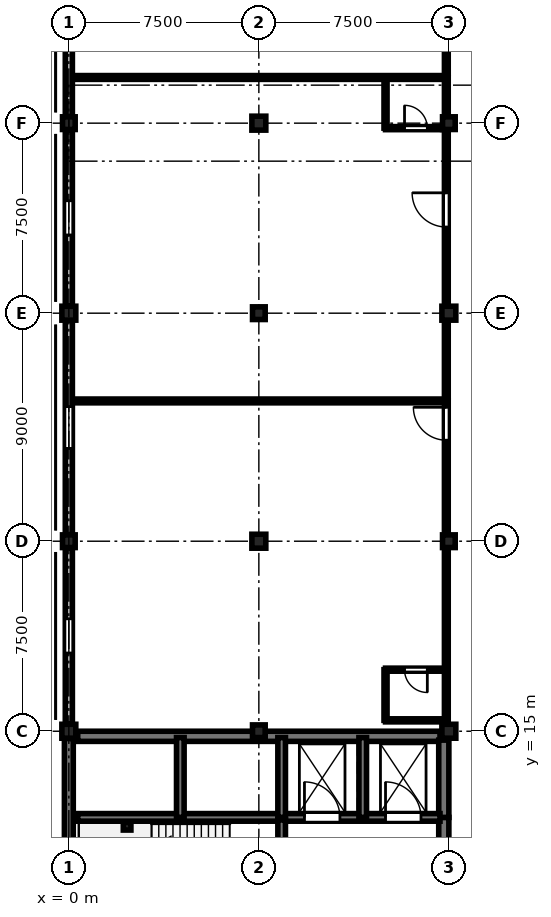
"""IFC4 building model, lengths in metres.
Left out: names, types, materials, properties, quantities, classifications, styles, units other than length and angle.
Written with IfcOpenShell. Run it as: python <this file> out.ifc"""

import sys

from ifc_helpers import new_model, si_unit, direction, frame, frame_2d, origin, origin_2d, place, context, subcontext, project, spatial, rectangle, i_section, extrude, element, fill, save


model = new_model("IFC4")
c1 = context("Model", 3, precision=1e-05, world=origin(), true_north=direction((0.0, 1.0)))
c2 = subcontext(c1, "Body", "Model", "MODEL_VIEW")
j1 = project(units=[si_unit("LENGTHUNIT", "METRE"), si_unit("PLANEANGLEUNIT", "RADIAN")], contexts=[c1])
p1 = place(None, origin())
s1 = spatial("IfcSite", under=j1, at=p1, CompositionType="ELEMENT")
p2 = place(p1, origin())
s2 = spatial("IfcBuilding", under=s1, at=p2, CompositionType="ELEMENT")
p3 = place(p2, frame((0.0, 0.0, 25.95)))
s3 = spatial("IfcBuildingStorey", under=s2, at=p3, CompositionType="ELEMENT", Elevation=25.95)
p4 = place(p3, frame((0.0, 15.0, 0.0), z_axis=(0.0, 0.0, 1.0), x_axis=(1.0, 0.0, 0.0)))
e1 = element("IfcColumn", 1, at=p4, inside=s3, PredefinedType="COLUMN", context=c2, shape_type="SweptSolid", body=[
    extrude(rectangle(XDim=0.55, YDim=0.55, at=origin_2d()), origin(), (0.0, 0.0, 1.0), 4.05),
])
p5 = place(p3, frame((0.0, 22.5, 0.0), z_axis=(0.0, 0.0, 1.0), x_axis=(1.0, 0.0, 0.0)))
e2 = element("IfcColumn", 2, at=p5, inside=s3, PredefinedType="COLUMN", context=c2, shape_type="SweptSolid", body=[
    extrude(rectangle(XDim=0.5, YDim=0.5, at=origin_2d()), origin(), (0.0, 0.0, 1.0), 4.05),
])
p6 = place(p3, frame((0.0, 31.5, 0.0), z_axis=(0.0, 0.0, 1.0), x_axis=(1.0, 0.0, 0.0)))
e3 = element("IfcColumn", 3, at=p6, inside=s3, PredefinedType="COLUMN", context=c2, shape_type="SweptSolid", body=[
    extrude(rectangle(XDim=0.55, YDim=0.55, at=origin_2d()), origin(), (0.0, 0.0, 1.0), 4.05),
])
for number, where, z_axis, x_axis in (
    (4, (0.0, 39.0, 0.0), (0.0, 0.0, 1.0), (1.0, 0.0, 0.0)),
    (5, (7.5, 15.0, 0.0), (0.0, 0.0, 1.0), (1.0, 0.0, 0.0)),
):
    element("IfcColumn", number, at=place(p3, frame(where, z_axis=z_axis, x_axis=x_axis)), inside=s3, PredefinedType="COLUMN", context=c2, shape_type="SweptSolid", body=[
        extrude(rectangle(XDim=0.5, YDim=0.5, at=origin_2d()), origin(), (0.0, 0.0, 1.0), 4.05),
    ])
p7 = place(p3, frame((7.5, 22.5, 0.0), z_axis=(0.0, 0.0, 1.0), x_axis=(1.0, 0.0, 0.0)))
e6 = element("IfcColumn", 6, at=p7, inside=s3, PredefinedType="COLUMN", context=c2, shape_type="SweptSolid", body=[
    extrude(rectangle(XDim=0.55, YDim=0.55, at=origin_2d()), origin(), (0.0, 0.0, 1.0), 4.05),
])
p8 = place(p3, frame((7.5, 31.5, 0.0), z_axis=(0.0, 0.0, 1.0), x_axis=(1.0, 0.0, 0.0)))
e7 = element("IfcColumn", 7, at=p8, inside=s3, PredefinedType="COLUMN", context=c2, shape_type="SweptSolid", body=[
    extrude(rectangle(XDim=0.5, YDim=0.5, at=origin_2d()), origin(), (0.0, 0.0, 1.0), 4.05),
])
for number, where, z_axis, x_axis in (
    (8, (7.5, 39.0, 0.0), (0.0, 0.0, 1.0), (1.0, 0.0, 0.0)),
    (9, (15.0, 15.0, 0.0), (0.0, 0.0, 1.0), (1.0, 0.0, 0.0)),
):
    element("IfcColumn", number, at=place(p3, frame(where, z_axis=z_axis, x_axis=x_axis)), inside=s3, PredefinedType="COLUMN", context=c2, shape_type="SweptSolid", body=[
        extrude(rectangle(XDim=0.55, YDim=0.55, at=origin_2d()), origin(), (0.0, 0.0, 1.0), 4.05),
    ])
p9 = place(p3, frame((15.0, 22.5, 0.0), z_axis=(0.0, 0.0, 1.0), x_axis=(1.0, 0.0, 0.0)))
e10 = element("IfcColumn", 10, at=p9, inside=s3, PredefinedType="COLUMN", context=c2, shape_type="SweptSolid", body=[
    extrude(rectangle(XDim=0.5, YDim=0.5, at=origin_2d()), origin(), (0.0, 0.0, 1.0), 4.05),
])
p10 = place(p3, frame((15.0, 31.5, 0.0), z_axis=(0.0, 0.0, 1.0), x_axis=(1.0, 0.0, 0.0)))
e11 = element("IfcColumn", 11, at=p10, inside=s3, PredefinedType="COLUMN", context=c2, shape_type="SweptSolid", body=[
    extrude(rectangle(XDim=0.55, YDim=0.55, at=origin_2d()), origin(), (0.0, 0.0, 1.0), 4.05),
])
p11 = place(p3, frame((15.0, 39.0, 0.0), z_axis=(0.0, 0.0, 1.0), x_axis=(1.0, 0.0, 0.0)))
e12 = element("IfcColumn", 12, at=p11, inside=s3, PredefinedType="COLUMN", context=c2, shape_type="SweptSolid", body=[
    extrude(rectangle(XDim=0.5, YDim=0.5, at=origin_2d()), origin(), (0.0, 0.0, 1.0), 4.05),
])
p12 = place(p3, frame((2.3, 11.25, 0.0), z_axis=(0.0, 0.0, 1.0), x_axis=(1.0, 0.0, 0.0)))
e13 = element("IfcColumn", 13, at=p12, inside=s3, PredefinedType="COLUMN", context=c2, shape_type="SweptSolid", body=[
    extrude(i_section(OverallWidth=0.3, OverallDepth=0.3, WebThickness=0.011, FlangeThickness=0.019, FilletRadius=0.027, at=origin_2d()), origin(), (0.0, 0.0, 1.0), 4.05),
])
p13 = place(p3, frame((0.0, 7.76, 0.0), z_axis=(0.0, 0.0, 1.0), x_axis=(0.0, 1.0, 0.0)))
e14 = element("IfcWall", 14, at=p13, inside=s3, PredefinedType="SHEAR", context=c2, shape_type="SweptSolid", body=[
    extrude(rectangle(XDim=6.955, YDim=0.35, at=frame_2d((3.478, 0.0))), origin(), (0.0, 0.0, 1.0), 3.77),
])
p14 = place(p3, frame((0.0, 15.285, 0.0), z_axis=(0.0, 0.0, 1.0), x_axis=(0.0, 1.0, 0.0)))
e15 = element("IfcWall", 15, at=p14, inside=s3, PredefinedType="STANDARD", context=c2, shape_type="SweptSolid", body=[
    extrude(rectangle(XDim=6.955, YDim=0.28, at=frame_2d((3.478, 0.0))), origin(), (0.0, 0.0, 1.0), 3.17),
])
p15 = place(p14, frame((2.802, 0.0, 0.85)))
e16 = element("IfcOpeningElement", 16, at=p15, cuts=e15, PredefinedType="OPENING", context=c2, shape_type="SweptSolid", body=[
    extrude(rectangle(XDim=1.35, YDim=2.04, at=frame_2d((0.675, 1.02))), frame((0.0, 0.15, 0.0), z_axis=(0.0, -1.0, 0.0), x_axis=(1.0, 0.0, 0.0)), (0.0, 0.0, 1.0), 0.3),
])
p16 = place(p3, frame((0.0, 22.76, 0.0), z_axis=(0.0, 0.0, 1.0), x_axis=(0.0, 1.0, 0.0)))
e17 = element("IfcWall", 17, at=p16, inside=s3, PredefinedType="STANDARD", context=c2, shape_type="SweptSolid", body=[
    extrude(rectangle(XDim=8.455, YDim=0.28, at=frame_2d((4.228, 0.0))), origin(), (0.0, 0.0, 1.0), 3.22),
])
p17 = place(p16, frame((3.403, 0.0, 0.85)))
e18 = element("IfcOpeningElement", 18, at=p17, cuts=e17, PredefinedType="OPENING", context=c2, shape_type="SweptSolid", body=[
    extrude(rectangle(XDim=1.65, YDim=2.09, at=frame_2d((0.825, 1.045))), frame((0.0, 0.15, 0.0), z_axis=(0.0, -1.0, 0.0), x_axis=(1.0, 0.0, 0.0)), (0.0, 0.0, 1.0), 0.3),
])
p18 = place(p3, frame((0.0, 31.785, 0.0), z_axis=(0.0, 0.0, 1.0), x_axis=(0.0, 1.0, 0.0)))
e19 = element("IfcWall", 19, at=p18, inside=s3, PredefinedType="STANDARD", context=c2, shape_type="SweptSolid", body=[
    extrude(rectangle(XDim=6.955, YDim=0.28, at=frame_2d((3.478, 0.0))), origin(), (0.0, 0.0, 1.0), 3.17),
])
p19 = place(p18, frame((2.802, 0.0, 0.85)))
e20 = element("IfcOpeningElement", 20, at=p19, cuts=e19, PredefinedType="OPENING", context=c2, shape_type="SweptSolid", body=[
    extrude(rectangle(XDim=1.35, YDim=2.04, at=frame_2d((0.675, 1.02))), frame((0.0, 0.15, 0.0), z_axis=(0.0, -1.0, 0.0), x_axis=(1.0, 0.0, 0.0)), (0.0, 0.0, 1.0), 0.3),
])
p20 = place(p3, frame((0.0, 39.26, 0.0), z_axis=(0.0, 0.0, 1.0), x_axis=(0.0, 1.0, 0.0)))
e21 = element("IfcWall", 21, at=p20, inside=s3, PredefinedType="STANDARD", context=c2, shape_type="SweptSolid", body=[
    extrude(rectangle(XDim=6.955, YDim=0.28, at=frame_2d((3.478, 0.0))), origin(), (0.0, 0.0, 1.0), 3.17),
])
p21 = place(p20, frame((2.653, 0.0, 0.85)))
e22 = element("IfcOpeningElement", 22, at=p21, cuts=e21, PredefinedType="OPENING", context=c2, shape_type="SweptSolid", body=[
    extrude(rectangle(XDim=1.65, YDim=2.04, at=frame_2d((0.825, 1.02))), frame((0.0, 0.15, 0.0), z_axis=(0.0, -1.0, 0.0), x_axis=(1.0, 0.0, 0.0)), (0.0, 0.0, 1.0), 0.3),
])
p22 = place(p3, frame((0.35, 14.8, 0.0), z_axis=(0.0, 0.0, 1.0), x_axis=(1.0, 0.0, 0.0)))
e23 = element("IfcWall", 23, at=p22, inside=s3, PredefinedType="SHEAR", context=c2, shape_type="SweptSolid", body=[
    extrude(rectangle(XDim=14.3, YDim=0.4, at=frame_2d((7.15, 0.0))), origin(), (0.0, 0.0, 1.0), 3.77),
])
p23 = place(p3, frame((14.8, 7.85, 0.0), z_axis=(0.0, 0.0, 1.0), x_axis=(0.0, 1.0, 0.0)))
e24 = element("IfcWall", 24, at=p23, inside=s3, PredefinedType="SHEAR", context=c2, shape_type="SweptSolid", body=[
    extrude(rectangle(XDim=3.75, YDim=0.4, at=frame_2d((1.875, 0.0))), origin(), (0.0, 0.0, 1.0), 3.77),
])
p24 = place(p3, frame((14.8, 11.6, 0.0), z_axis=(0.0, 0.0, 1.0), x_axis=(0.0, 1.0, 0.0)))
e25 = element("IfcWall", 25, at=p24, inside=s3, PredefinedType="SHEAR", context=c2, shape_type="SweptSolid", body=[
    extrude(rectangle(XDim=3.05, YDim=0.4, at=frame_2d((1.525, 0.0))), origin(), (0.0, 0.0, 1.0), 3.77),
])
p25 = place(p3, frame((0.35, 11.6, 0.0), z_axis=(0.0, 0.0, 1.0), x_axis=(1.0, 0.0, 0.0)))
e26 = element("IfcWall", 26, at=p25, inside=s3, PredefinedType="SHEAR", context=c2, shape_type="SweptSolid", body=[
    extrude(rectangle(XDim=8.05, YDim=0.3, at=frame_2d((4.025, 0.0))), origin(), (0.0, 0.0, 1.0), 3.77),
])
p26 = place(p3, frame((8.4, 11.6, 0.0), z_axis=(0.0, 0.0, 1.0), x_axis=(1.0, 0.0, 0.0)))
e27 = element("IfcWall", 27, at=p26, inside=s3, PredefinedType="SHEAR", context=c2, shape_type="SweptSolid", body=[
    extrude(rectangle(XDim=6.25, YDim=0.3, at=frame_2d((3.125, 0.0))), origin(), (0.0, 0.0, 1.0), 3.77),
])
p27 = place(p26, frame((0.9, 0.0, 0.0)))
e28 = element("IfcOpeningElement", 28, at=p27, cuts=e27, PredefinedType="OPENING", context=c2, shape_type="SweptSolid", body=[
    extrude(rectangle(XDim=1.4, YDim=2.25, at=frame_2d((0.7, 1.125))), frame((0.0, 0.16, 0.0), z_axis=(0.0, -1.0, 0.0), x_axis=(1.0, 0.0, 0.0)), (0.0, 0.0, 1.0), 0.32),
])
p28 = place(p26, frame((4.1, 0.0, 0.0)))
e29 = element("IfcOpeningElement", 29, at=p28, cuts=e27, PredefinedType="OPENING", context=c2, shape_type="SweptSolid", body=[
    extrude(rectangle(XDim=1.4, YDim=2.25, at=frame_2d((0.7, 1.125))), frame((0.0, 0.16, 0.0), z_axis=(0.0, -1.0, 0.0), x_axis=(1.0, 0.0, 0.0)), (0.0, 0.0, 1.0), 0.32),
])
p29 = place(p3, frame((8.4, 11.5, 0.0), z_axis=(0.0, 0.0, 1.0), x_axis=(0.0, -1.0, 0.0)))
e30 = element("IfcWall", 30, at=p29, inside=s3, PredefinedType="SHEAR", context=c2, shape_type="SweptSolid", body=[
    extrude(rectangle(XDim=3.65, YDim=0.3, at=frame_2d((1.825, 0.0))), origin(), (0.0, 0.0, 1.0), 3.77),
])
p30 = place(p29, frame((1.22, 0.0, 0.0)))
e31 = element("IfcOpeningElement", 31, at=p30, cuts=e30, PredefinedType="OPENING", context=c2, shape_type="SweptSolid", body=[
    extrude(rectangle(XDim=1.2, YDim=2.25, at=frame_2d((0.6, 1.125))), frame((0.0, 0.16, 0.0), z_axis=(0.0, -1.0, 0.0), x_axis=(1.0, 0.0, 0.0)), (0.0, 0.0, 1.0), 0.32),
])
for number, where, z_axis, x_axis in (
    (32, (4.4, 11.6, 0.0), (0.0, 0.0, 1.0), (0.0, 1.0, 0.0)),
    (33, (8.4, 11.6, 0.0), (0.0, 0.0, 1.0), (0.0, 1.0, 0.0)),
    (34, (11.6, 11.6, 0.0), (0.0, 0.0, 1.0), (0.0, 1.0, 0.0)),
):
    element("IfcWall", number, at=place(p3, frame(where, z_axis=z_axis, x_axis=x_axis)), inside=s3, PredefinedType="SHEAR", context=c2, shape_type="SweptSolid", body=[
        extrude(rectangle(XDim=3.15, YDim=0.3, at=frame_2d((1.575, 0.0))), origin(), (0.0, 0.0, 1.0), 3.77),
    ])
p31 = place(p3, frame((14.9, 15.43, 0.0), z_axis=(0.0, 0.0, 1.0), x_axis=(0.0, 1.0, 0.0)))
e35 = element("IfcWall", 35, at=p31, inside=s3, PredefinedType="PARTITIONING", context=c2, shape_type="SweptSolid", body=[
    extrude(rectangle(XDim=12.607, YDim=0.15, at=frame_2d((6.303, 0.0))), origin(), (0.0, 0.0, 1.0), 3.055),
])
p32 = place(p31, frame((11.057, 0.0, 0.0)))
e36 = element("IfcOpeningElement", 36, at=p32, cuts=e35, PredefinedType="OPENING", context=c2, shape_type="SweptSolid", body=[
    extrude(rectangle(XDim=1.3, YDim=2.2, at=frame_2d((0.65, 1.1))), frame((0.0, 0.085, 0.0), z_axis=(0.0, -1.0, 0.0), x_axis=(1.0, 0.0, 0.0)), (0.0, 0.0, 1.0), 0.17),
])
p33 = place(p3, frame((14.9, 17.43, 0.0), z_axis=(0.0, 0.0, 1.0), x_axis=(-1.0, 0.0, 0.0)))
e37 = element("IfcWall", 37, at=p33, inside=s3, PredefinedType="PARTITIONING", context=c2, shape_type="SweptSolid", body=[
    extrude(rectangle(XDim=2.4, YDim=0.12, at=frame_2d((1.2, 0.0))), origin(), (0.0, 0.0, 1.0), 3.755),
])
p34 = place(p33, frame((0.75, 0.0, 0.0)))
e38 = element("IfcOpeningElement", 38, at=p34, cuts=e37, PredefinedType="OPENING", context=c2, shape_type="SweptSolid", body=[
    extrude(rectangle(XDim=0.9, YDim=2.1, at=frame_2d((0.45, 1.05))), frame((0.0, 0.07, 0.0), z_axis=(0.0, -1.0, 0.0), x_axis=(1.0, 0.0, 0.0)), (0.0, 0.0, 1.0), 0.14),
])
p35 = place(p3, frame((12.5, 15.43, 0.0), z_axis=(0.0, 0.0, 1.0), x_axis=(0.0, 1.0, 0.0)))
e39 = element("IfcWall", 39, at=p35, inside=s3, PredefinedType="PARTITIONING", context=c2, shape_type="SweptSolid", body=[
    extrude(rectangle(XDim=2.0, YDim=0.12, at=frame_2d((1.0, 0.0))), origin(), (0.0, 0.0, 1.0), 3.755),
])
p36 = place(p3, frame((14.9, 28.197, 0.0), z_axis=(0.0, 0.0, 1.0), x_axis=(0.0, 1.0, 0.0)))
e40 = element("IfcWall", 40, at=p36, inside=s3, PredefinedType="PARTITIONING", context=c2, shape_type="SweptSolid", body=[
    extrude(rectangle(XDim=12.606, YDim=0.15, at=frame_2d((6.303, 0.0))), origin(), (0.0, 0.0, 1.0), 3.055),
])
p37 = place(p36, frame((6.704, 0.0, 0.0)))
e41 = element("IfcOpeningElement", 41, at=p37, cuts=e40, PredefinedType="OPENING", context=c2, shape_type="SweptSolid", body=[
    extrude(rectangle(XDim=1.35, YDim=2.25, at=frame_2d((0.675, 1.125))), frame((0.0, 0.085, 0.0), z_axis=(0.0, -1.0, 0.0), x_axis=(1.0, 0.0, 0.0)), (0.0, 0.0, 1.0), 0.17),
])
p38 = place(p3, frame((12.5, 38.803, 0.0), z_axis=(0.0, 0.0, 1.0), x_axis=(1.0, 0.0, 0.0)))
e42 = element("IfcWall", 42, at=p38, inside=s3, PredefinedType="PARTITIONING", context=c2, shape_type="SweptSolid", body=[
    extrude(rectangle(XDim=2.4, YDim=0.12, at=frame_2d((1.2, 0.0))), origin(), (0.0, 0.0, 1.0), 3.155),
])
p39 = place(p38, frame((0.75, 0.0, 0.0)))
e43 = element("IfcOpeningElement", 43, at=p39, cuts=e42, PredefinedType="OPENING", context=c2, shape_type="SweptSolid", body=[
    extrude(rectangle(XDim=0.9, YDim=2.1, at=frame_2d((0.45, 1.05))), frame((0.0, 0.07, 0.0), z_axis=(0.0, -1.0, 0.0), x_axis=(1.0, 0.0, 0.0)), (0.0, 0.0, 1.0), 0.14),
])
p40 = place(p3, frame((12.5, 38.803, 0.0), z_axis=(0.0, 0.0, 1.0), x_axis=(0.0, 1.0, 0.0)))
e44 = element("IfcWall", 44, at=p40, inside=s3, PredefinedType="PARTITIONING", context=c2, shape_type="SweptSolid", body=[
    extrude(rectangle(XDim=2.0, YDim=0.12, at=frame_2d((1.0, 0.0))), origin(), (0.0, 0.0, 1.0), 3.755),
])
p41 = place(p3, frame((14.9, 40.963, 0.0), z_axis=(0.0, 0.0, 1.0), x_axis=(0.0, 1.0, 0.0)))
e45 = element("IfcWall", 45, at=p41, inside=s3, PredefinedType="PARTITIONING", context=c2, shape_type="SweptSolid", body=[
    extrude(rectangle(XDim=12.607, YDim=0.15, at=frame_2d((6.303, 0.0))), origin(), (0.0, 0.0, 1.0), 3.205),
])
p42 = place(p41, frame((1.331, 0.0, 0.0)))
e46 = element("IfcOpeningElement", 46, at=p42, cuts=e45, PredefinedType="OPENING", context=c2, shape_type="SweptSolid", body=[
    extrude(rectangle(XDim=1.3, YDim=2.2, at=frame_2d((0.65, 1.1))), frame((0.0, 0.085, 0.0), z_axis=(0.0, -1.0, 0.0), x_axis=(1.0, 0.0, 0.0)), (0.0, 0.0, 1.0), 0.17),
])
for number, where, z_axis, x_axis in (
    (47, (0.35, 28.037, 0.0), (0.0, 0.0, 1.0), (1.0, 0.0, 0.0)),
    (48, (0.35, 40.803, 0.0), (0.0, 0.0, 1.0), (1.0, 0.0, 0.0)),
):
    element("IfcWall", number, at=place(p3, frame(where, z_axis=z_axis, x_axis=x_axis)), inside=s3, PredefinedType="PARTITIONING", context=c2, shape_type="SweptSolid", body=[
        extrude(rectangle(XDim=14.55, YDim=0.15, at=frame_2d((7.275, 0.0))), origin(), (0.0, 0.0, 1.0), 3.755),
    ])
p43 = place(p3, frame((12.5, 15.43, 0.0), z_axis=(0.0, 0.0, 1.0), x_axis=(1.0, 0.0, 0.0)))
e49 = element("IfcWall", 49, at=p43, inside=s3, PredefinedType="PARTITIONING", context=c2, shape_type="SweptSolid", body=[
    extrude(rectangle(XDim=2.4, YDim=0.12, at=frame_2d((1.2, 0.0))), origin(), (0.0, 0.0, 1.0), 3.755),
])
p44 = place(p15, origin())
e50 = element("IfcWindow", 50, at=p44, inside=s3, PartitioningType="SINGLE_PANEL", PredefinedType="WINDOW", context=c2, shape_type="SweptSolid", body=[
    extrude(rectangle(XDim=1.35, YDim=2.04, at=frame_2d((0.675, 1.02))), frame((0.0, 0.03, 0.0), z_axis=(0.0, -1.0, 0.0), x_axis=(1.0, 0.0, 0.0)), (0.0, 0.0, 1.0), 0.06),
])
fill(e16, e50)
p45 = place(p17, origin())
e51 = element("IfcWindow", 51, at=p45, inside=s3, PartitioningType="SINGLE_PANEL", PredefinedType="WINDOW", context=c2, shape_type="SweptSolid", body=[
    extrude(rectangle(XDim=1.65, YDim=2.09, at=frame_2d((0.825, 1.045))), frame((0.0, 0.03, 0.0), z_axis=(0.0, -1.0, 0.0), x_axis=(1.0, 0.0, 0.0)), (0.0, 0.0, 1.0), 0.06),
])
fill(e18, e51)
p46 = place(p19, origin())
e52 = element("IfcWindow", 52, at=p46, inside=s3, PartitioningType="SINGLE_PANEL", PredefinedType="WINDOW", context=c2, shape_type="SweptSolid", body=[
    extrude(rectangle(XDim=1.35, YDim=2.04, at=frame_2d((0.675, 1.02))), frame((0.0, 0.03, 0.0), z_axis=(0.0, -1.0, 0.0), x_axis=(1.0, 0.0, 0.0)), (0.0, 0.0, 1.0), 0.06),
])
fill(e20, e52)
p47 = place(p27, origin())
e53 = element("IfcDoor", 53, at=p47, inside=s3, OperationType="DOUBLE_DOOR_SLIDING", PredefinedType="DOOR", context=c2, shape_type="SweptSolid", body=[
    extrude(rectangle(XDim=1.4, YDim=2.25, at=frame_2d((0.7, 1.125))), frame((0.0, 0.025, 0.0), z_axis=(0.0, -1.0, 0.0), x_axis=(1.0, 0.0, 0.0)), (0.0, 0.0, 1.0), 0.05),
])
fill(e28, e53)
p48 = place(p28, origin())
e54 = element("IfcDoor", 54, at=p48, inside=s3, OperationType="DOUBLE_DOOR_SLIDING", PredefinedType="DOOR", context=c2, shape_type="SweptSolid", body=[
    extrude(rectangle(XDim=1.4, YDim=2.25, at=frame_2d((0.7, 1.125))), frame((0.0, 0.025, 0.0), z_axis=(0.0, -1.0, 0.0), x_axis=(1.0, 0.0, 0.0)), (0.0, 0.0, 1.0), 0.05),
])
fill(e29, e54)
p49 = place(p32, origin())
e55 = element("IfcDoor", 55, at=p49, inside=s3, OperationType="SINGLE_SWING_RIGHT", PredefinedType="DOOR", context=c2, shape_type="SweptSolid", body=[
    extrude(rectangle(XDim=1.3, YDim=2.2, at=frame_2d((0.65, 1.1))), frame((0.0, 0.025, 0.0), z_axis=(0.0, -1.0, 0.0), x_axis=(1.0, 0.0, 0.0)), (0.0, 0.0, 1.0), 0.05),
])
fill(e36, e55)
p50 = place(p34, origin())
e56 = element("IfcDoor", 56, at=p50, inside=s3, OperationType="SINGLE_SWING_LEFT", PredefinedType="DOOR", context=c2, shape_type="SweptSolid", body=[
    extrude(rectangle(XDim=0.9, YDim=2.1, at=frame_2d((0.45, 1.05))), frame((0.0, 0.025, 0.0), z_axis=(0.0, -1.0, 0.0), x_axis=(1.0, 0.0, 0.0)), (0.0, 0.0, 1.0), 0.05),
])
fill(e38, e56)
p51 = place(p37, origin())
e57 = element("IfcDoor", 57, at=p51, inside=s3, OperationType="SINGLE_SWING_RIGHT", PredefinedType="DOOR", context=c2, shape_type="SweptSolid", body=[
    extrude(rectangle(XDim=1.35, YDim=2.25, at=frame_2d((0.675, 1.125))), frame((0.0, 0.025, 0.0), z_axis=(0.0, -1.0, 0.0), x_axis=(1.0, 0.0, 0.0)), (0.0, 0.0, 1.0), 0.05),
])
fill(e41, e57)
p52 = place(p39, origin())
e58 = element("IfcDoor", 58, at=p52, inside=s3, OperationType="SINGLE_SWING_LEFT", PredefinedType="DOOR", context=c2, shape_type="SweptSolid", body=[
    extrude(rectangle(XDim=0.9, YDim=2.1, at=frame_2d((0.45, 1.05))), frame((0.0, 0.025, 0.0), z_axis=(0.0, -1.0, 0.0), x_axis=(1.0, 0.0, 0.0)), (0.0, 0.0, 1.0), 0.05),
])
fill(e43, e58)
save(model, sys.argv[1])
